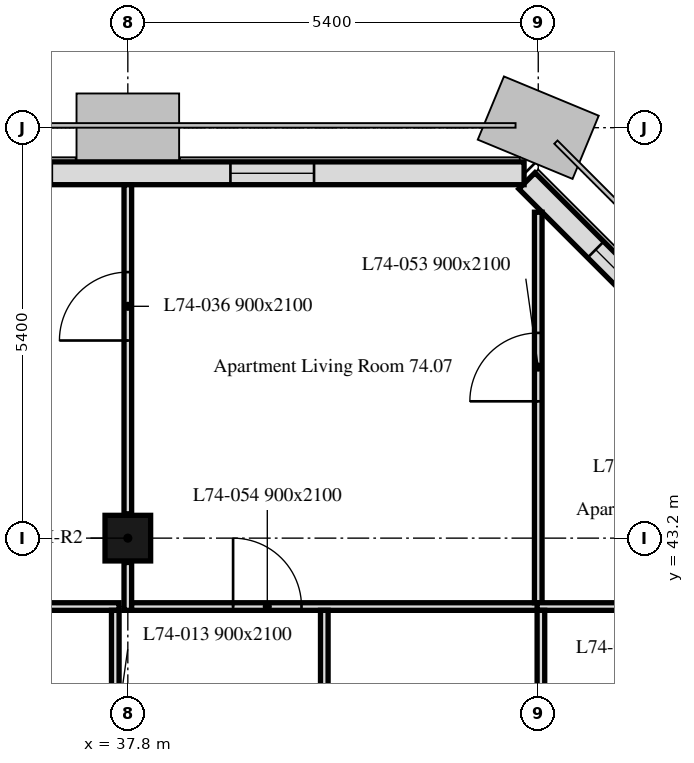
"""IFC4 building model, lengths in metres.
Left out: names, types, materials, properties, quantities, classifications, styles, units other than length and angle.
Written with IfcOpenShell. Run it as: python <this file> out.ifc"""

import sys

from ifc_helpers import new_model, si_unit, direction, frame, frame_2d, origin, origin_2d, place, context, subcontext, project, spatial, rectangle, extrude, element, fill, save


model = new_model("IFC4")
c1 = context("Model", 3, precision=1e-05, world=origin(), true_north=direction((0.0, 1.0)))
c2 = subcontext(c1, "Body", "Model", "MODEL_VIEW")
j1 = project(units=[si_unit("LENGTHUNIT", "METRE"), si_unit("PLANEANGLEUNIT", "RADIAN")], contexts=[c1])
p1 = place(None, origin())
s1 = spatial("IfcSite", under=j1, at=p1, CompositionType="ELEMENT")
p2 = place(p1, origin())
s2 = spatial("IfcBuilding", under=s1, at=p2, CompositionType="ELEMENT")
p3 = place(p2, frame((0.0, 0.0, 298.3)))
s3 = spatial("IfcBuildingStorey", under=s2, at=p3, CompositionType="ELEMENT", Elevation=298.3)
p4 = place(p3, frame((37.8, 43.2, 0.0), z_axis=(0.0, 0.0, 1.0), x_axis=(1.0, 0.0, 0.0)))
e1 = element("IfcColumn", 1, at=p4, inside=s3, PredefinedType="COLUMN", context=c2, shape_type="SweptSolid", body=[
    extrude(rectangle(XDim=0.6, YDim=0.6, at=origin_2d()), origin(), (0.0, 0.0, 1.0), 3.0),
])
p5 = place(p3, frame((47.901, 43.051, 0.0), z_axis=(0.0, 0.0, 1.0), x_axis=(-0.707106781187, 0.707106781187, 0.0)))
e2 = element("IfcWall", 2, at=p5, inside=s3, PredefinedType="SOLIDWALL", context=c2, shape_type="SweptSolid", body=[
    extrude(rectangle(XDim=6.86, YDim=0.3, at=frame_2d((3.43, 0.0))), origin(), (0.0, 0.0, 1.0), 3.0),
])
p6 = place(p5, frame((1.28, 0.0, 0.9)))
e3 = element("IfcOpeningElement", 3, at=p6, cuts=e2, PredefinedType="OPENING", context=c2, shape_type="SweptSolid", body=[
    extrude(rectangle(XDim=1.1, YDim=1.7, at=frame_2d((0.55, 0.85))), frame((0.0, 0.16, 0.0), z_axis=(0.0, -1.0, 0.0), x_axis=(1.0, 0.0, 0.0)), (0.0, 0.0, 1.0), 0.32),
])
p7 = place(p5, frame((4.48, 0.0, 0.9)))
e4 = element("IfcOpeningElement", 4, at=p7, cuts=e2, PredefinedType="OPENING", context=c2, shape_type="SweptSolid", body=[
    extrude(rectangle(XDim=1.1, YDim=1.7, at=frame_2d((0.55, 0.85))), frame((0.0, 0.16, 0.0), z_axis=(0.0, -1.0, 0.0), x_axis=(1.0, 0.0, 0.0)), (0.0, 0.0, 1.0), 0.32),
])
p8 = place(p3, frame((43.014, 48.0, 0.0), z_axis=(0.0, 0.0, 1.0), x_axis=(-1.0, 0.0, 0.0)))
e5 = element("IfcWall", 5, at=p8, inside=s3, PredefinedType="SOLIDWALL", context=c2, shape_type="SweptSolid", body=[
    extrude(rectangle(XDim=32.027, YDim=0.3, at=frame_2d((16.014, 0.0))), origin(), (0.0, 0.0, 1.0), 3.0),
])
p9 = place(p8, frame((2.764, 0.0, 0.9)))
e6 = element("IfcOpeningElement", 6, at=p9, cuts=e5, PredefinedType="OPENING", context=c2, shape_type="SweptSolid", body=[
    extrude(rectangle(XDim=1.1, YDim=1.7, at=frame_2d((0.55, 0.85))), frame((0.0, 0.16, 0.0), z_axis=(0.0, -1.0, 0.0), x_axis=(1.0, 0.0, 0.0)), (0.0, 0.0, 1.0), 0.32),
])
p10 = place(p8, frame((6.214, 0.0, 0.9)))
e7 = element("IfcOpeningElement", 7, at=p10, cuts=e5, PredefinedType="OPENING", context=c2, shape_type="SweptSolid", body=[
    extrude(rectangle(XDim=3.4, YDim=1.7, at=frame_2d((1.7, 0.85))), frame((0.0, 0.16, 0.0), z_axis=(0.0, -1.0, 0.0), x_axis=(1.0, 0.0, 0.0)), (0.0, 0.0, 1.0), 0.32),
])
p11 = place(p8, frame((13.564, 0.0, 0.9)))
e8 = element("IfcOpeningElement", 8, at=p11, cuts=e5, PredefinedType="OPENING", context=c2, shape_type="SweptSolid", body=[
    extrude(rectangle(XDim=1.1, YDim=1.7, at=frame_2d((0.55, 0.85))), frame((0.0, 0.16, 0.0), z_axis=(0.0, -1.0, 0.0), x_axis=(1.0, 0.0, 0.0)), (0.0, 0.0, 1.0), 0.32),
])
p12 = place(p8, frame((17.014, 0.0, 0.9)))
e9 = element("IfcOpeningElement", 9, at=p12, cuts=e5, PredefinedType="OPENING", context=c2, shape_type="SweptSolid", body=[
    extrude(rectangle(XDim=3.4, YDim=1.7, at=frame_2d((1.7, 0.85))), frame((0.0, 0.16, 0.0), z_axis=(0.0, -1.0, 0.0), x_axis=(1.0, 0.0, 0.0)), (0.0, 0.0, 1.0), 0.32),
])
p13 = place(p8, frame((24.364, 0.0, 0.9)))
e10 = element("IfcOpeningElement", 10, at=p13, cuts=e5, PredefinedType="OPENING", context=c2, shape_type="SweptSolid", body=[
    extrude(rectangle(XDim=1.1, YDim=1.7, at=frame_2d((0.55, 0.85))), frame((0.0, 0.16, 0.0), z_axis=(0.0, -1.0, 0.0), x_axis=(1.0, 0.0, 0.0)), (0.0, 0.0, 1.0), 0.32),
])
p14 = place(p8, frame((27.814, 0.0, 0.9)))
e11 = element("IfcOpeningElement", 11, at=p14, cuts=e5, PredefinedType="OPENING", context=c2, shape_type="SweptSolid", body=[
    extrude(rectangle(XDim=3.4, YDim=1.7, at=frame_2d((1.7, 0.85))), frame((0.0, 0.16, 0.0), z_axis=(0.0, -1.0, 0.0), x_axis=(1.0, 0.0, 0.0)), (0.0, 0.0, 1.0), 0.32),
])
p15 = place(p3, frame((32.475, 42.3, 0.0), z_axis=(0.0, 0.0, 1.0), x_axis=(1.0, 0.0, 0.0)))
e12 = element("IfcWall", 12, at=p15, inside=s3, PredefinedType="PARTITIONING", context=c2, shape_type="SweptSolid", body=[
    extrude(rectangle(XDim=5.21, YDim=0.1, at=frame_2d((2.605, 0.0))), origin(), (0.0, 0.0, 1.0), 3.0),
])
p16 = place(p15, frame((1.46, 0.0, 0.0)))
e13 = element("IfcOpeningElement", 13, at=p16, cuts=e12, PredefinedType="OPENING", context=c2, shape_type="SweptSolid", body=[
    extrude(rectangle(XDim=0.9, YDim=2.1, at=frame_2d((0.45, 1.05))), frame((0.0, 0.05, 0.0), z_axis=(0.0, -1.0, 0.0), x_axis=(1.0, 0.0, 0.0)), (0.0, 0.0, 1.0), 0.1),
])
p17 = place(p3, frame((37.8, 42.25, 0.0), z_axis=(0.0, 0.0, 1.0), x_axis=(0.0, 1.0, 0.0)))
e14 = element("IfcWall", 14, at=p17, inside=s3, PredefinedType="PARTITIONING", context=c2, shape_type="SweptSolid", body=[
    extrude(rectangle(XDim=0.63, YDim=0.1, at=frame_2d((0.315, 0.0))), origin(), (0.0, 0.0, 1.0), 2.4),
])
p18 = place(p3, frame((37.8, 43.52, 0.0), z_axis=(0.0, 0.0, 1.0), x_axis=(0.0, 1.0, 0.0)))
e15 = element("IfcWall", 15, at=p18, inside=s3, PredefinedType="PARTITIONING", context=c2, shape_type="SweptSolid", body=[
    extrude(rectangle(XDim=4.329, YDim=0.1, at=frame_2d((2.165, 0.0))), origin(), (0.0, 0.0, 1.0), 2.4),
])
p19 = place(p18, frame((2.28, 0.0, 0.0)))
e16 = element("IfcOpeningElement", 16, at=p19, cuts=e15, PredefinedType="OPENING", context=c2, shape_type="SweptSolid", body=[
    extrude(rectangle(XDim=0.9, YDim=2.1, at=frame_2d((0.45, 1.05))), frame((0.0, 0.05, 0.0), z_axis=(0.0, -1.0, 0.0), x_axis=(1.0, 0.0, 0.0)), (0.0, 0.0, 1.0), 0.1),
])
p20 = place(p3, frame((37.85, 42.3, 0.0), z_axis=(0.0, 0.0, 1.0), x_axis=(1.0, 0.0, 0.0)))
e17 = element("IfcWall", 17, at=p20, inside=s3, PredefinedType="PARTITIONING", context=c2, shape_type="SweptSolid", body=[
    extrude(rectangle(XDim=5.4, YDim=0.1, at=frame_2d((2.7, 0.0))), origin(), (0.0, 0.0, 1.0), 3.0),
])
p21 = place(p20, frame((1.335, 0.0, 0.0)))
e18 = element("IfcOpeningElement", 18, at=p21, cuts=e17, PredefinedType="OPENING", context=c2, shape_type="SweptSolid", body=[
    extrude(rectangle(XDim=0.9, YDim=2.1, at=frame_2d((0.45, 1.05))), frame((0.0, 0.05, 0.0), z_axis=(0.0, -1.0, 0.0), x_axis=(1.0, 0.0, 0.0)), (0.0, 0.0, 1.0), 0.1),
])
p22 = place(p3, frame((43.2, 42.35, 0.0), z_axis=(0.0, 0.0, 1.0), x_axis=(0.0, 1.0, 0.0)))
e19 = element("IfcWall", 19, at=p22, inside=s3, PredefinedType="PARTITIONING", context=c2, shape_type="SweptSolid", body=[
    extrude(rectangle(XDim=5.138, YDim=0.1, at=frame_2d((2.569, 0.0))), origin(), (0.0, 0.0, 1.0), 3.0),
])
p23 = place(p22, frame((2.65, 0.0, 0.0)))
e20 = element("IfcOpeningElement", 20, at=p23, cuts=e19, PredefinedType="OPENING", context=c2, shape_type="SweptSolid", body=[
    extrude(rectangle(XDim=0.9, YDim=2.1, at=frame_2d((0.45, 1.05))), frame((0.0, 0.05, 0.0), z_axis=(0.0, -1.0, 0.0), x_axis=(1.0, 0.0, 0.0)), (0.0, 0.0, 1.0), 0.1),
])
p24 = place(p3, frame((43.185, 42.3, 0.0), z_axis=(0.0, 0.0, 1.0), x_axis=(1.0, 0.0, 0.0)))
e21 = element("IfcWall", 21, at=p24, inside=s3, PredefinedType="PARTITIONING", context=c2, shape_type="SweptSolid", body=[
    extrude(rectangle(XDim=4.664, YDim=0.1, at=frame_2d((2.332, 0.0))), origin(), (0.0, 0.0, 1.0), 3.0),
])
p25 = place(p24, frame((3.1, 0.0, 0.0)))
e22 = element("IfcOpeningElement", 22, at=p25, cuts=e21, PredefinedType="OPENING", context=c2, shape_type="SweptSolid", body=[
    extrude(rectangle(XDim=0.9, YDim=2.1, at=frame_2d((0.45, 1.05))), frame((0.0, 0.05, 0.0), z_axis=(0.0, -1.0, 0.0), x_axis=(1.0, 0.0, 0.0)), (0.0, 0.0, 1.0), 0.1),
])
p26 = place(p24, frame((1.04, 0.0, 0.0)))
e23 = element("IfcOpeningElement", 23, at=p26, cuts=e21, PredefinedType="OPENING", context=c2, shape_type="SweptSolid", body=[
    extrude(rectangle(XDim=0.9, YDim=2.1, at=frame_2d((0.45, 1.05))), frame((0.0, 0.05, 0.0), z_axis=(0.0, -1.0, 0.0), x_axis=(1.0, 0.0, 0.0)), (0.0, 0.0, 1.0), 0.1),
])
p27 = place(p3, frame((37.635, 38.12, 0.0), z_axis=(0.0, 0.0, 1.0), x_axis=(0.0, 1.0, 0.0)))
e24 = element("IfcWall", 24, at=p27, inside=s3, PredefinedType="PARTITIONING", context=c2, shape_type="SweptSolid", body=[
    extrude(rectangle(XDim=4.13, YDim=0.1, at=frame_2d((2.065, 0.0))), origin(), (0.0, 0.0, 1.0), 2.4),
])
p28 = place(p27, frame((2.005, 0.0, 0.0)))
e25 = element("IfcOpeningElement", 25, at=p28, cuts=e24, PredefinedType="OPENING", context=c2, shape_type="SweptSolid", body=[
    extrude(rectangle(XDim=0.9, YDim=2.1, at=frame_2d((0.45, 1.05))), frame((0.0, 0.05, 0.0), z_axis=(0.0, -1.0, 0.0), x_axis=(1.0, 0.0, 0.0)), (0.0, 0.0, 1.0), 0.1),
])
p29 = place(p3, frame((40.385, 34.275, 0.0), z_axis=(0.0, 0.0, 1.0), x_axis=(0.0, 1.0, 0.0)))
e26 = element("IfcWall", 26, at=p29, inside=s3, PredefinedType="PARTITIONING", context=c2, shape_type="SweptSolid", body=[
    extrude(rectangle(XDim=7.975, YDim=0.1, at=frame_2d((3.988, 0.0))), origin(), (0.0, 0.0, 1.0), 2.4),
])
p30 = place(p29, frame((4.875, 0.0, 0.0)))
e27 = element("IfcOpeningElement", 27, at=p30, cuts=e26, PredefinedType="OPENING", context=c2, shape_type="SweptSolid", body=[
    extrude(rectangle(XDim=0.9, YDim=2.1, at=frame_2d((0.45, 1.05))), frame((0.0, 0.05, 0.0), z_axis=(0.0, -1.0, 0.0), x_axis=(1.0, 0.0, 0.0)), (0.0, 0.0, 1.0), 0.1),
])
p31 = place(p29, frame((0.262, 0.0, 0.0)))
e28 = element("IfcOpeningElement", 28, at=p31, cuts=e26, PredefinedType="OPENING", context=c2, shape_type="SweptSolid", body=[
    extrude(rectangle(XDim=0.9, YDim=2.1, at=frame_2d((0.45, 1.05))), frame((0.0, 0.05, 0.0), z_axis=(0.0, -1.0, 0.0), x_axis=(1.0, 0.0, 0.0)), (0.0, 0.0, 1.0), 0.1),
])
p32 = place(p3, frame((43.235, 38.12, 0.0), z_axis=(0.0, 0.0, 1.0), x_axis=(0.0, 1.0, 0.0)))
e29 = element("IfcWall", 29, at=p32, inside=s3, PredefinedType="PARTITIONING", context=c2, shape_type="SweptSolid", body=[
    extrude(rectangle(XDim=4.13, YDim=0.1, at=frame_2d((2.065, 0.0))), origin(), (0.0, 0.0, 1.0), 3.0),
])
p33 = place(p7, origin())
e30 = element("IfcWindow", 30, at=p33, inside=s3, PartitioningType="SINGLE_PANEL", PredefinedType="WINDOW", context=c2, shape_type="SweptSolid", body=[
    extrude(rectangle(XDim=1.1, YDim=1.7, at=frame_2d((0.55, 0.85))), frame((0.0, 0.03, 0.0), z_axis=(0.0, -1.0, 0.0), x_axis=(1.0, 0.0, 0.0)), (0.0, 0.0, 1.0), 0.06),
])
fill(e4, e30)
p34 = place(p9, origin())
e31 = element("IfcWindow", 31, at=p34, inside=s3, PartitioningType="SINGLE_PANEL", PredefinedType="WINDOW", context=c2, shape_type="SweptSolid", body=[
    extrude(rectangle(XDim=1.1, YDim=1.7, at=frame_2d((0.55, 0.85))), frame((0.0, 0.03, 0.0), z_axis=(0.0, -1.0, 0.0), x_axis=(1.0, 0.0, 0.0)), (0.0, 0.0, 1.0), 0.06),
])
fill(e6, e31)
p35 = place(p19, origin())
e32 = element("IfcDoor", 32, at=p35, inside=s3, OperationType="SINGLE_SWING_LEFT", PredefinedType="DOOR", context=c2, shape_type="SweptSolid", body=[
    extrude(rectangle(XDim=0.9, YDim=2.1, at=frame_2d((0.45, 1.05))), frame((0.0, 0.025, 0.0), z_axis=(0.0, -1.0, 0.0), x_axis=(1.0, 0.0, 0.0)), (0.0, 0.0, 1.0), 0.05),
])
fill(e16, e32)
p36 = place(p23, origin())
e33 = element("IfcDoor", 33, at=p36, inside=s3, OperationType="SINGLE_SWING_RIGHT", PredefinedType="DOOR", context=c2, shape_type="SweptSolid", body=[
    extrude(rectangle(XDim=0.9, YDim=2.1, at=frame_2d((0.45, 1.05))), frame((0.0, 0.025, 0.0), z_axis=(0.0, -1.0, 0.0), x_axis=(1.0, 0.0, 0.0)), (0.0, 0.0, 1.0), 0.05),
])
fill(e20, e33)
p37 = place(p21, origin())
e34 = element("IfcDoor", 34, at=p37, inside=s3, OperationType="SINGLE_SWING_RIGHT", PredefinedType="DOOR", context=c2, shape_type="SweptSolid", body=[
    extrude(rectangle(XDim=0.9, YDim=2.1, at=frame_2d((0.45, 1.05))), frame((0.0, 0.025, 0.0), z_axis=(0.0, -1.0, 0.0), x_axis=(1.0, 0.0, 0.0)), (0.0, 0.0, 1.0), 0.05),
])
fill(e18, e34)
save(model, sys.argv[1])
